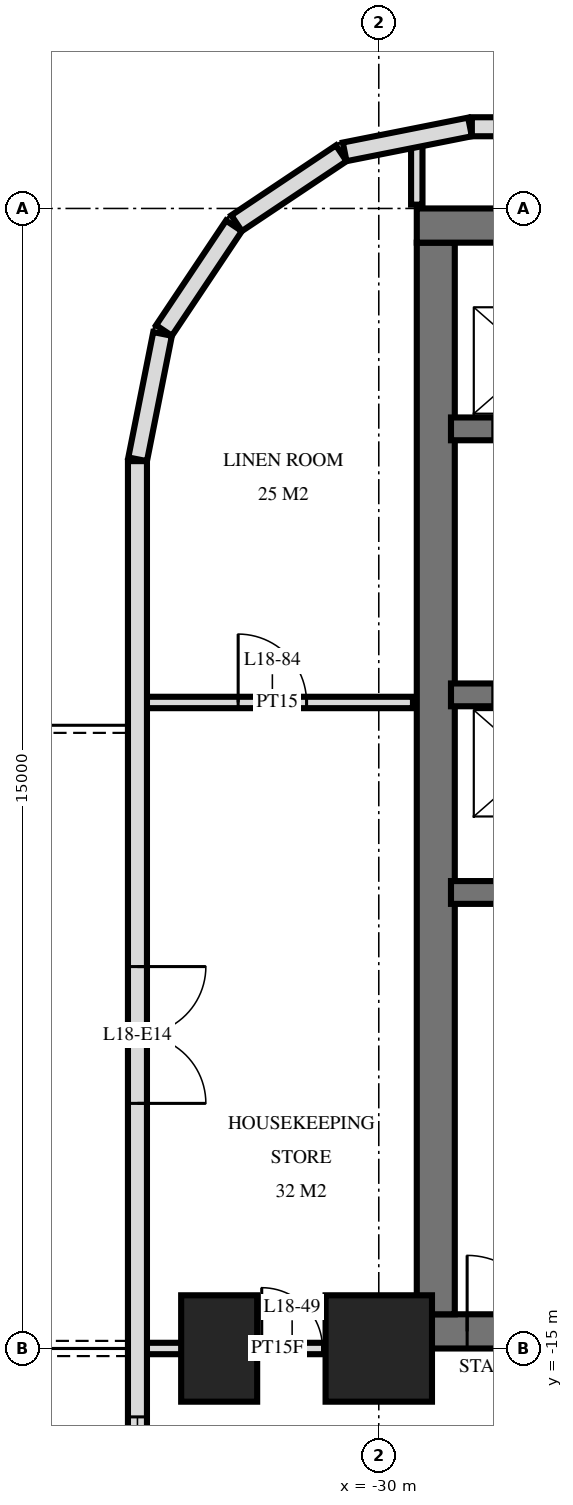
"""IFC4 building model, lengths in metres.
Left out: names, types, materials, properties, quantities, classifications, styles, units other than length and angle.
Written with IfcOpenShell. Run it as: python <this file> out.ifc"""

import sys

from ifc_helpers import new_model, si_unit, direction, frame, frame_2d, origin, origin_2d, place, context, subcontext, project, spatial, rectangle, extrude, element, fill, save


model = new_model("IFC4")
c1 = context("Model", 3, precision=1e-05, world=origin(), true_north=direction((0.0, 1.0)))
c2 = subcontext(c1, "Body", "Model", "MODEL_VIEW")
j1 = project(units=[si_unit("LENGTHUNIT", "METRE"), si_unit("PLANEANGLEUNIT", "RADIAN")], contexts=[c1])
p1 = place(None, origin())
s1 = spatial("IfcSite", under=j1, at=p1, CompositionType="ELEMENT")
p2 = place(p1, origin())
s2 = spatial("IfcBuilding", under=s1, at=p2, CompositionType="ELEMENT")
p3 = place(p2, frame((0.0, 0.0, 74.4)))
s3 = spatial("IfcBuildingStorey", under=s2, at=p3, CompositionType="ELEMENT", Elevation=74.4)
p4 = place(p3, frame((-32.1, -15.0, 0.0), z_axis=(0.0, 0.0, 1.0), x_axis=(0.0, 1.0, 0.0)))
e1 = element("IfcColumn", 1, at=p4, inside=s3, PredefinedType="COLUMN", context=c2, shape_type="SweptSolid", body=[
    extrude(rectangle(XDim=1.4, YDim=1.0, at=origin_2d()), origin(), (0.0, 0.0, 1.0), 3.6),
])
p5 = place(p3, frame((-30.0, -15.0, 0.0), z_axis=(0.0, 0.0, 1.0), x_axis=(1.0, 0.0, 0.0)))
e2 = element("IfcColumn", 2, at=p5, inside=s3, PredefinedType="COLUMN", context=c2, shape_type="SweptSolid", body=[
    extrude(rectangle(XDim=1.4, YDim=1.4, at=origin_2d()), origin(), (0.0, 0.0, 1.0), 3.6),
])
p6 = place(p3, frame((-29.5, -0.225, 0.0), z_axis=(0.0, 0.0, 1.0), x_axis=(1.0, 0.0, 0.0)))
e3 = element("IfcWall", 3, at=p6, inside=s3, PredefinedType="SHEAR", context=c2, shape_type="SweptSolid", body=[
    extrude(rectangle(XDim=19.5, YDim=0.45, at=frame_2d((9.75, 0.0))), origin(), (0.0, 0.0, 1.0), 3.6),
])
p7 = place(p3, frame((-29.5, -14.775, 0.0), z_axis=(0.0, 0.0, 1.0), x_axis=(1.0, 0.0, 0.0)))
e4 = element("IfcWall", 4, at=p7, inside=s3, PredefinedType="SHEAR", context=c2, shape_type="SweptSolid", body=[
    extrude(rectangle(XDim=19.5, YDim=0.45, at=frame_2d((9.75, 0.0))), origin(), (0.0, 0.0, 1.0), 3.6),
])
p8 = place(p7, frame((11.2, 0.0, 0.0)))
e5 = element("IfcOpeningElement", 5, at=p8, cuts=e4, PredefinedType="OPENING", context=c2, shape_type="SweptSolid", body=[
    extrude(rectangle(XDim=1.2, YDim=2.1, at=frame_2d((0.6, 1.05))), frame((0.0, 0.235, 0.0), z_axis=(0.0, -1.0, 0.0), x_axis=(1.0, 0.0, 0.0)), (0.0, 0.0, 1.0), 0.47),
])
p9 = place(p7, frame((14.25, 0.0, 0.0)))
e6 = element("IfcOpeningElement", 6, at=p9, cuts=e4, PredefinedType="OPENING", context=c2, shape_type="SweptSolid", body=[
    extrude(rectangle(XDim=1.1, YDim=2.1, at=frame_2d((0.55, 1.05))), frame((0.0, 0.235, 0.0), z_axis=(0.0, -1.0, 0.0), x_axis=(1.0, 0.0, 0.0)), (0.0, 0.0, 1.0), 0.47),
])
p10 = place(p7, frame((8.5, 0.0, 0.0)))
e7 = element("IfcOpeningElement", 7, at=p10, cuts=e4, PredefinedType="OPENING", context=c2, shape_type="SweptSolid", body=[
    extrude(rectangle(XDim=0.9, YDim=2.1, at=frame_2d((0.45, 1.05))), frame((0.0, 0.235, 0.0), z_axis=(0.0, -1.0, 0.0), x_axis=(1.0, 0.0, 0.0)), (0.0, 0.0, 1.0), 0.47),
])
p11 = place(p7, frame((6.05, 0.0, 0.0)))
e8 = element("IfcOpeningElement", 8, at=p11, cuts=e4, PredefinedType="OPENING", context=c2, shape_type="SweptSolid", body=[
    extrude(rectangle(XDim=1.0, YDim=2.1, at=frame_2d((0.5, 1.05))), frame((0.0, 0.235, 0.0), z_axis=(0.0, -1.0, 0.0), x_axis=(1.0, 0.0, 0.0)), (0.0, 0.0, 1.0), 0.47),
])
p12 = place(p7, frame((2.988, 0.0, 0.0)))
e9 = element("IfcOpeningElement", 9, at=p12, cuts=e4, PredefinedType="OPENING", context=c2, shape_type="SweptSolid", body=[
    extrude(rectangle(XDim=1.0, YDim=2.1, at=frame_2d((0.5, 1.05))), frame((0.0, 0.235, 0.0), z_axis=(0.0, -1.0, 0.0), x_axis=(1.0, 0.0, 0.0)), (0.0, 0.0, 1.0), 0.47),
])
p13 = place(p7, frame((0.663, 0.0, 0.0)))
e10 = element("IfcOpeningElement", 10, at=p13, cuts=e4, PredefinedType="OPENING", context=c2, shape_type="SweptSolid", body=[
    extrude(rectangle(XDim=1.0, YDim=2.1, at=frame_2d((0.5, 1.05))), frame((0.0, 0.235, 0.0), z_axis=(0.0, -1.0, 0.0), x_axis=(1.0, 0.0, 0.0)), (0.0, 0.0, 1.0), 0.47),
])
p14 = place(p3, frame((-29.25, -14.55, 0.0), z_axis=(0.0, 0.0, 1.0), x_axis=(0.0, 1.0, 0.0)))
e11 = element("IfcWall", 11, at=p14, inside=s3, PredefinedType="SHEAR", context=c2, shape_type="SweptSolid", body=[
    extrude(rectangle(XDim=14.1, YDim=0.5, at=frame_2d((7.05, 0.0))), origin(), (0.0, 0.0, 1.0), 3.6),
])
p15 = place(p3, frame((-29.05, -2.9, 0.0), z_axis=(0.0, 0.0, 1.0), x_axis=(1.0, 0.0, 0.0)))
e12 = element("IfcWall", 12, at=p15, inside=s3, PredefinedType="SHEAR", context=c2, shape_type="SweptSolid", body=[
    extrude(rectangle(XDim=18.7, YDim=0.3, at=frame_2d((9.35, 0.0))), origin(), (0.0, 0.0, 1.0), 3.6),
])
p16 = place(p15, frame((2.95, 0.0, 0.0)))
e13 = element("IfcOpeningElement", 13, at=p16, cuts=e12, PredefinedType="OPENING", context=c2, shape_type="SweptSolid", body=[
    extrude(rectangle(XDim=1.1, YDim=2.1, at=frame_2d((0.55, 1.05))), frame((0.0, 0.16, 0.0), z_axis=(0.0, -1.0, 0.0), x_axis=(1.0, 0.0, 0.0)), (0.0, 0.0, 1.0), 0.32),
])
p17 = place(p15, frame((0.55, 0.0, 0.0)))
e14 = element("IfcOpeningElement", 14, at=p17, cuts=e12, PredefinedType="OPENING", context=c2, shape_type="SweptSolid", body=[
    extrude(rectangle(XDim=1.1, YDim=2.1, at=frame_2d((0.55, 1.05))), frame((0.0, 0.16, 0.0), z_axis=(0.0, -1.0, 0.0), x_axis=(1.0, 0.0, 0.0)), (0.0, 0.0, 1.0), 0.32),
])
p18 = place(p15, frame((11.863, 0.0, 0.0)))
e15 = element("IfcOpeningElement", 15, at=p18, cuts=e12, PredefinedType="OPENING", context=c2, shape_type="SweptSolid", body=[
    extrude(rectangle(XDim=0.9, YDim=2.1, at=frame_2d((0.45, 1.05))), frame((0.0, 0.16, 0.0), z_axis=(0.0, -1.0, 0.0), x_axis=(1.0, 0.0, 0.0)), (0.0, 0.0, 1.0), 0.32),
])
p19 = place(p15, frame((10.438, 0.0, 0.0)))
e16 = element("IfcOpeningElement", 16, at=p19, cuts=e12, PredefinedType="OPENING", context=c2, shape_type="SweptSolid", body=[
    extrude(rectangle(XDim=0.9, YDim=2.1, at=frame_2d((0.45, 1.05))), frame((0.0, 0.16, 0.0), z_axis=(0.0, -1.0, 0.0), x_axis=(1.0, 0.0, 0.0)), (0.0, 0.0, 1.0), 0.32),
])
p20 = place(p15, frame((16.85, 0.0, 0.0)))
e17 = element("IfcOpeningElement", 17, at=p20, cuts=e12, PredefinedType="OPENING", context=c2, shape_type="SweptSolid", body=[
    extrude(rectangle(XDim=1.0, YDim=2.1, at=frame_2d((0.5, 1.05))), frame((0.0, 0.16, 0.0), z_axis=(0.0, -1.0, 0.0), x_axis=(1.0, 0.0, 0.0)), (0.0, 0.0, 1.0), 0.32),
])
p21 = place(p15, frame((14.562, 0.0, 0.0)))
e18 = element("IfcOpeningElement", 18, at=p21, cuts=e12, PredefinedType="OPENING", context=c2, shape_type="SweptSolid", body=[
    extrude(rectangle(XDim=1.0, YDim=2.1, at=frame_2d((0.5, 1.05))), frame((0.0, 0.16, 0.0), z_axis=(0.0, -1.0, 0.0), x_axis=(1.0, 0.0, 0.0)), (0.0, 0.0, 1.0), 0.32),
])
p22 = place(p15, frame((13.137, 0.0, 0.0)))
e19 = element("IfcOpeningElement", 19, at=p22, cuts=e12, PredefinedType="OPENING", context=c2, shape_type="SweptSolid", body=[
    extrude(rectangle(XDim=1.0, YDim=2.1, at=frame_2d((0.5, 1.05))), frame((0.0, 0.16, 0.0), z_axis=(0.0, -1.0, 0.0), x_axis=(1.0, 0.0, 0.0)), (0.0, 0.0, 1.0), 0.32),
])
p23 = place(p15, frame((5.6, 0.0, 0.0)))
e20 = element("IfcOpeningElement", 20, at=p23, cuts=e12, PredefinedType="OPENING", context=c2, shape_type="SweptSolid", body=[
    extrude(rectangle(XDim=1.0, YDim=2.1, at=frame_2d((0.5, 1.05))), frame((0.0, 0.16, 0.0), z_axis=(0.0, -1.0, 0.0), x_axis=(1.0, 0.0, 0.0)), (0.0, 0.0, 1.0), 0.32),
])
p24 = place(p3, frame((-29.05, -6.4, 0.0), z_axis=(0.0, 0.0, 1.0), x_axis=(1.0, 0.0, 0.0)))
e21 = element("IfcWall", 21, at=p24, inside=s3, PredefinedType="SHEAR", context=c2, shape_type="SweptSolid", body=[
    extrude(rectangle(XDim=18.7, YDim=0.3, at=frame_2d((9.35, 0.0))), origin(), (0.0, 0.0, 1.0), 3.6),
])
p25 = place(p24, frame((2.95, 0.0, 0.0)))
e22 = element("IfcOpeningElement", 22, at=p25, cuts=e21, PredefinedType="OPENING", context=c2, shape_type="SweptSolid", body=[
    extrude(rectangle(XDim=1.1, YDim=2.1, at=frame_2d((0.55, 1.05))), frame((0.0, 0.16, 0.0), z_axis=(0.0, -1.0, 0.0), x_axis=(1.0, 0.0, 0.0)), (0.0, 0.0, 1.0), 0.32),
])
p26 = place(p24, frame((0.55, 0.0, 0.0)))
e23 = element("IfcOpeningElement", 23, at=p26, cuts=e21, PredefinedType="OPENING", context=c2, shape_type="SweptSolid", body=[
    extrude(rectangle(XDim=1.1, YDim=2.1, at=frame_2d((0.55, 1.05))), frame((0.0, 0.16, 0.0), z_axis=(0.0, -1.0, 0.0), x_axis=(1.0, 0.0, 0.0)), (0.0, 0.0, 1.0), 0.32),
])
p27 = place(p24, frame((10.8, 0.0, 0.0)))
e24 = element("IfcOpeningElement", 24, at=p27, cuts=e21, PredefinedType="OPENING", context=c2, shape_type="SweptSolid", body=[
    extrude(rectangle(XDim=1.1, YDim=2.1, at=frame_2d((0.55, 1.05))), frame((0.0, 0.16, 0.0), z_axis=(0.0, -1.0, 0.0), x_axis=(1.0, 0.0, 0.0)), (0.0, 0.0, 1.0), 0.32),
])
p28 = place(p24, frame((5.6, 0.0, 0.0)))
e25 = element("IfcOpeningElement", 25, at=p28, cuts=e21, PredefinedType="OPENING", context=c2, shape_type="SweptSolid", body=[
    extrude(rectangle(XDim=1.0, YDim=2.1, at=frame_2d((0.5, 1.05))), frame((0.0, 0.16, 0.0), z_axis=(0.0, -1.0, 0.0), x_axis=(1.0, 0.0, 0.0)), (0.0, 0.0, 1.0), 0.32),
])
p29 = place(p3, frame((-29.05, -9.0, 0.0), z_axis=(0.0, 0.0, 1.0), x_axis=(1.0, 0.0, 0.0)))
e26 = element("IfcWall", 26, at=p29, inside=s3, PredefinedType="SHEAR", context=c2, shape_type="SweptSolid", body=[
    extrude(rectangle(XDim=18.7, YDim=0.3, at=frame_2d((9.35, 0.0))), origin(), (0.0, 0.0, 1.0), 3.6),
])
p30 = place(p29, frame((13.8, 0.0, 0.0)))
e27 = element("IfcOpeningElement", 27, at=p30, cuts=e26, PredefinedType="OPENING", context=c2, shape_type="SweptSolid", body=[
    extrude(rectangle(XDim=1.1, YDim=2.1, at=frame_2d((0.55, 1.05))), frame((0.0, 0.16, 0.0), z_axis=(0.0, -1.0, 0.0), x_axis=(1.0, 0.0, 0.0)), (0.0, 0.0, 1.0), 0.32),
])
p31 = place(p3, frame((28.775, 1.075, 0.0), z_axis=(0.0, 0.0, 1.0), x_axis=(-1.0, 0.0, 0.0)))
e28 = element("IfcWall", 28, at=p31, inside=s3, PredefinedType="SOLIDWALL", context=c2, shape_type="SweptSolid", body=[
    extrude(rectangle(XDim=57.551, YDim=0.25, at=frame_2d((28.775, 0.0))), origin(), (0.0, 0.0, 1.0), 3.32),
])
p32 = place(p31, frame((35.575, 0.0, 0.3)))
e29 = element("IfcOpeningElement", 29, at=p32, cuts=e28, PredefinedType="OPENING", context=c2, shape_type="SweptSolid", body=[
    extrude(rectangle(XDim=2.4, YDim=2.1, at=frame_2d((1.2, 1.05))), frame((0.0, 0.135, 0.0), z_axis=(0.0, -1.0, 0.0), x_axis=(1.0, 0.0, 0.0)), (0.0, 0.0, 1.0), 0.27),
])
p33 = place(p3, frame((-28.8, 1.073, 0.0), z_axis=(0.0, 0.0, 1.0), x_axis=(-0.980803419081, -0.194999110559, 0.0)))
e30 = element("IfcWall", 30, at=p33, inside=s3, PredefinedType="SOLIDWALL", context=c2, shape_type="SweptSolid", body=[
    extrude(rectangle(XDim=1.681, YDim=0.25, at=frame_2d((0.841, 0.0))), origin(), (0.0, 0.0, 1.0), 3.32),
])
for number, where, z_axis, x_axis in (
    (31, (-30.494, 0.726, 0.0), (0.0, 0.0, 1.0), (-0.831, -0.556, 0.0)),
    (32, (-31.906, -0.229, 0.0), (0.0, 0.0, 1.0), (-0.556, -0.831, 0.0)),
):
    element("IfcWall", number, at=place(p3, frame(where, z_axis=z_axis, x_axis=x_axis)), inside=s3, PredefinedType="SOLIDWALL", context=c2, shape_type="SweptSolid", body=[
        extrude(rectangle(XDim=1.656, YDim=0.25, at=frame_2d((0.828, 0.0))), origin(), (0.0, 0.0, 1.0), 3.32),
    ])
p34 = place(p3, frame((-32.844, -1.651, 0.0), z_axis=(0.0, 0.0, 1.0), x_axis=(-0.19513878023, -0.980775640221, 0.0)))
e33 = element("IfcWall", 33, at=p34, inside=s3, PredefinedType="SOLIDWALL", context=c2, shape_type="SweptSolid", body=[
    extrude(rectangle(XDim=1.681, YDim=0.25, at=frame_2d((0.841, 0.0))), origin(), (0.0, 0.0, 1.0), 3.32),
])
p35 = place(p3, frame((-33.175, -3.325, 0.0), z_axis=(0.0, 0.0, 1.0), x_axis=(0.0, -1.0, 0.0)))
e34 = element("IfcWall", 34, at=p35, inside=s3, PredefinedType="SOLIDWALL", context=c2, shape_type="SweptSolid", body=[
    extrude(rectangle(XDim=21.551, YDim=0.25, at=frame_2d((10.775, 0.0))), origin(), (0.0, 0.0, 1.0), 3.32),
])
p36 = place(p35, frame((6.65, 0.0, 0.0)))
e35 = element("IfcOpeningElement", 35, at=p36, cuts=e34, PredefinedType="OPENING", context=c2, shape_type="SweptSolid", body=[
    extrude(rectangle(XDim=1.8, YDim=2.4, at=frame_2d((0.9, 1.2))), frame((0.0, 0.135, 0.0), z_axis=(0.0, -1.0, 0.0), x_axis=(1.0, 0.0, 0.0)), (0.0, 0.0, 1.0), 0.27),
])
p37 = place(p35, frame((12.575, 0.0, 0.3)))
e36 = element("IfcOpeningElement", 36, at=p37, cuts=e34, PredefinedType="OPENING", context=c2, shape_type="SweptSolid", body=[
    extrude(rectangle(XDim=1.2, YDim=2.1, at=frame_2d((0.6, 1.05))), frame((0.0, 0.135, 0.0), z_axis=(0.0, -1.0, 0.0), x_axis=(1.0, 0.0, 0.0)), (0.0, 0.0, 1.0), 0.27),
])
p38 = place(p35, frame((15.275, 0.0, 0.0)))
e37 = element("IfcOpeningElement", 37, at=p38, cuts=e34, PredefinedType="OPENING", context=c2, shape_type="SweptSolid", body=[
    extrude(rectangle(XDim=1.8, YDim=2.4, at=frame_2d((0.9, 1.2))), frame((0.0, 0.135, 0.0), z_axis=(0.0, -1.0, 0.0), x_axis=(1.0, 0.0, 0.0)), (0.0, 0.0, 1.0), 0.27),
])
p39 = place(p35, frame((18.875, 0.0, 0.0)))
e38 = element("IfcOpeningElement", 38, at=p39, cuts=e34, PredefinedType="OPENING", context=c2, shape_type="SweptSolid", body=[
    extrude(rectangle(XDim=1.8, YDim=2.4, at=frame_2d((0.9, 1.2))), frame((0.0, 0.135, 0.0), z_axis=(0.0, -1.0, 0.0), x_axis=(1.0, 0.0, 0.0)), (0.0, 0.0, 1.0), 0.27),
])
p40 = place(p3, frame((-29.5, 0.05, 0.0), z_axis=(0.0, 0.0, 1.0), x_axis=(0.0, 1.0, 0.0)))
e39 = element("IfcWall", 39, at=p40, inside=s3, PredefinedType="PARTITIONING", context=c2, shape_type="SweptSolid", body=[
    extrude(rectangle(XDim=0.827, YDim=0.15, at=frame_2d((0.414, 0.0))), origin(), (0.0, 0.0, 1.0), 3.32),
])
p41 = place(p3, frame((-33.12, -15.0, 0.0), z_axis=(0.0, 0.0, 1.0), x_axis=(1.0, 0.0, 0.0)))
e40 = element("IfcWall", 40, at=p41, inside=s3, PredefinedType="PARTITIONING", context=c2, shape_type="SweptSolid", body=[
    extrude(rectangle(XDim=3.57, YDim=0.15, at=frame_2d((1.785, 0.0))), origin(), (0.0, 0.0, 1.0), 3.32),
])
p42 = place(p41, frame((1.58, 0.0, 0.0)))
e41 = element("IfcOpeningElement", 41, at=p42, cuts=e40, PredefinedType="OPENING", context=c2, shape_type="SweptSolid", body=[
    extrude(rectangle(XDim=0.8, YDim=2.1, at=frame_2d((0.4, 1.05))), frame((0.0, 0.085, 0.0), z_axis=(0.0, -1.0, 0.0), x_axis=(1.0, 0.0, 0.0)), (0.0, 0.0, 1.0), 0.17),
])
p43 = place(p3, frame((-33.12, -6.5, 0.0), z_axis=(0.0, 0.0, 1.0), x_axis=(1.0, 0.0, 0.0)))
e42 = element("IfcWall", 42, at=p43, inside=s3, PredefinedType="PARTITIONING", context=c2, shape_type="SweptSolid", body=[
    extrude(rectangle(XDim=3.57, YDim=0.15, at=frame_2d((1.785, 0.0))), origin(), (0.0, 0.0, 1.0), 3.32),
])
p44 = place(p43, frame((1.27, 0.0, 0.0)))
e43 = element("IfcOpeningElement", 43, at=p44, cuts=e42, PredefinedType="OPENING", context=c2, shape_type="SweptSolid", body=[
    extrude(rectangle(XDim=0.9, YDim=2.1, at=frame_2d((0.45, 1.05))), frame((0.0, 0.085, 0.0), z_axis=(0.0, -1.0, 0.0), x_axis=(1.0, 0.0, 0.0)), (0.0, 0.0, 1.0), 0.17),
])
p45 = place(p36, origin())
e44 = element("IfcDoor", 44, at=p45, inside=s3, OperationType="DOUBLE_DOOR_SINGLE_SWING", PredefinedType="DOOR", context=c2, shape_type="SweptSolid", body=[
    extrude(rectangle(XDim=1.8, YDim=2.4, at=frame_2d((0.9, 1.2))), frame((0.0, 0.025, 0.0), z_axis=(0.0, -1.0, 0.0), x_axis=(1.0, 0.0, 0.0)), (0.0, 0.0, 1.0), 0.05),
])
fill(e35, e44)
p46 = place(p37, origin())
e45 = element("IfcWindow", 45, at=p46, inside=s3, PartitioningType="SINGLE_PANEL", PredefinedType="WINDOW", context=c2, shape_type="SweptSolid", body=[
    extrude(rectangle(XDim=1.2, YDim=2.1, at=frame_2d((0.6, 1.05))), frame((0.0, 0.03, 0.0), z_axis=(0.0, -1.0, 0.0), x_axis=(1.0, 0.0, 0.0)), (0.0, 0.0, 1.0), 0.06),
])
fill(e36, e45)
p47 = place(p13, origin())
e46 = element("IfcDoor", 46, at=p47, inside=s3, OperationType="SINGLE_SWING_RIGHT", PredefinedType="DOOR", context=c2, shape_type="SweptSolid", body=[
    extrude(rectangle(XDim=1.0, YDim=2.1, at=frame_2d((0.5, 1.05))), frame((0.0, 0.025, 0.0), z_axis=(0.0, -1.0, 0.0), x_axis=(1.0, 0.0, 0.0)), (0.0, 0.0, 1.0), 0.05),
])
fill(e10, e46)
p48 = place(p42, origin())
e47 = element("IfcDoor", 47, at=p48, inside=s3, OperationType="SINGLE_SWING_RIGHT", PredefinedType="DOOR", context=c2, shape_type="SweptSolid", body=[
    extrude(rectangle(XDim=0.8, YDim=2.1, at=frame_2d((0.4, 1.05))), frame((0.0, 0.025, 0.0), z_axis=(0.0, -1.0, 0.0), x_axis=(1.0, 0.0, 0.0)), (0.0, 0.0, 1.0), 0.05),
])
fill(e41, e47)
p49 = place(p44, origin())
e48 = element("IfcDoor", 48, at=p49, inside=s3, OperationType="SINGLE_SWING_RIGHT", PredefinedType="DOOR", context=c2, shape_type="SweptSolid", body=[
    extrude(rectangle(XDim=0.9, YDim=2.1, at=frame_2d((0.45, 1.05))), frame((0.0, 0.025, 0.0), z_axis=(0.0, -1.0, 0.0), x_axis=(1.0, 0.0, 0.0)), (0.0, 0.0, 1.0), 0.05),
])
fill(e43, e48)
save(model, sys.argv[1])
